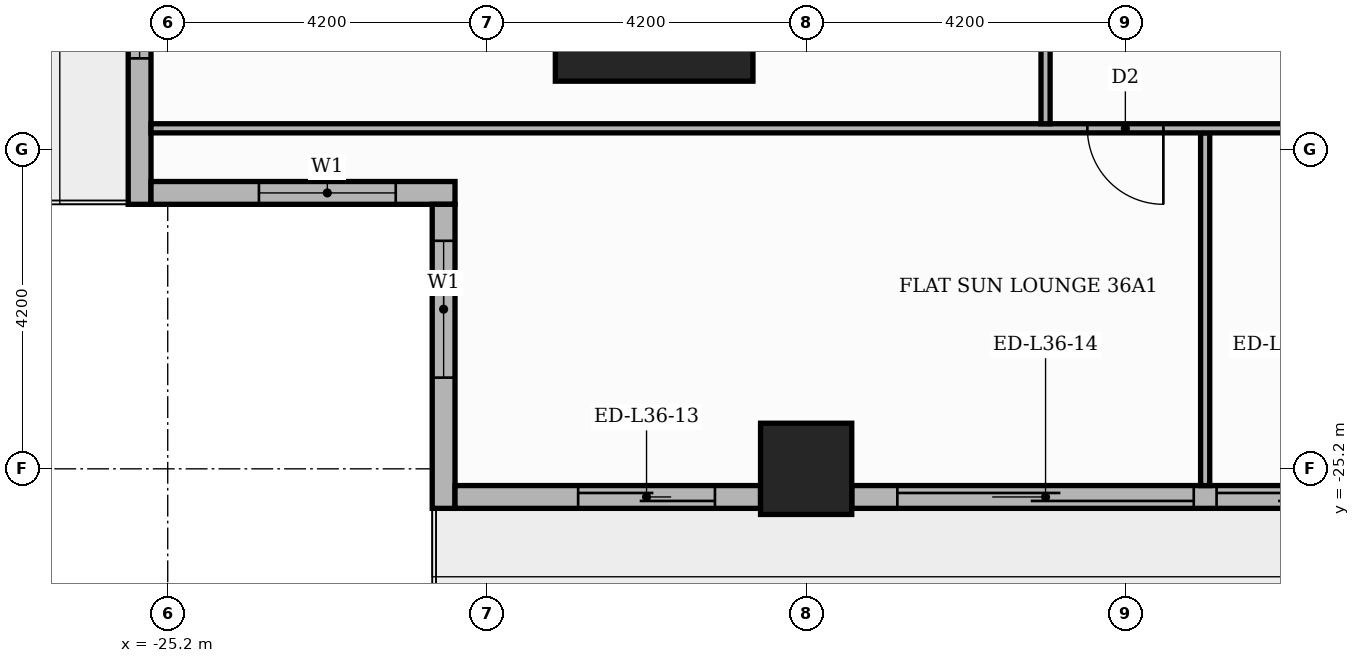
"""IFC4 building model, lengths in metres.
Left out: names, types, materials, properties, quantities, classifications, styles, units other than length and angle.
Written with IfcOpenShell. Run it as: python <this file> out.ifc"""

import sys

from ifc_helpers import new_model, si_unit, direction, frame, frame_2d, origin, origin_2d, place, context, subcontext, project, spatial, rectangle, extrude, element, fill, save


model = new_model("IFC4")
c1 = context("Model", 3, precision=1e-05, world=origin(), true_north=direction((0.0, 1.0)))
c2 = subcontext(c1, "Body", "Model", "MODEL_VIEW")
j1 = project(units=[si_unit("LENGTHUNIT", "METRE"), si_unit("PLANEANGLEUNIT", "RADIAN")], contexts=[c1])
p1 = place(None, origin())
s1 = spatial("IfcSite", under=j1, at=p1, CompositionType="ELEMENT")
p2 = place(p1, origin())
s2 = spatial("IfcBuilding", under=s1, at=p2, CompositionType="ELEMENT")
p3 = place(p2, frame((0.0, 0.0, 153.3)))
s3 = spatial("IfcBuildingStorey", under=s2, at=p3, CompositionType="ELEMENT", Elevation=153.3)
p4 = place(p3, frame((-18.8, -18.8, 0.0), z_axis=(0.0, 0.0, 1.0), x_axis=(1.0, 0.0, 0.0)))
e1 = element("IfcColumn", 1, at=p4, inside=s3, PredefinedType="COLUMN", context=c2, shape_type="SweptSolid", body=[
    extrude(rectangle(XDim=2.6, YDim=2.6, at=origin_2d()), origin(), (0.0, 0.0, 1.0), 3.9),
])
p5 = place(p3, frame((-16.8, -25.2, 0.0), z_axis=(0.0, 0.0, 1.0), x_axis=(1.0, 0.0, 0.0)))
e2 = element("IfcColumn", 2, at=p5, inside=s3, PredefinedType="COLUMN", context=c2, shape_type="SweptSolid", body=[
    extrude(rectangle(XDim=1.2, YDim=1.2, at=origin_2d()), origin(), (0.0, 0.0, 1.0), 3.9),
])
p6 = place(p3, frame((-25.57, -17.4, 0.0), z_axis=(0.0, 0.0, 1.0), x_axis=(0.0, -1.0, 0.0)))
e3 = element("IfcWall", 3, at=p6, inside=s3, PredefinedType="STANDARD", context=c2, shape_type="SweptSolid", body=[
    extrude(rectangle(XDim=4.32, YDim=0.3, at=frame_2d((2.16, 0.0))), origin(), (0.0, 0.0, 1.0), 3.48),
])
p7 = place(p6, frame((0.6, 0.0, 0.9)))
e4 = element("IfcOpeningElement", 4, at=p7, cuts=e3, PredefinedType="OPENING", context=c2, shape_type="SweptSolid", body=[
    extrude(rectangle(XDim=1.8, YDim=2.1, at=frame_2d((0.9, 1.05))), frame((0.0, 0.16, 0.0), z_axis=(0.0, -1.0, 0.0), x_axis=(1.0, 0.0, 0.0)), (0.0, 0.0, 1.0), 0.32),
])
p8 = place(p3, frame((-25.42, -21.57, 0.0), z_axis=(0.0, 0.0, 1.0), x_axis=(1.0, 0.0, 0.0)))
e5 = element("IfcWall", 5, at=p8, inside=s3, PredefinedType="STANDARD", context=c2, shape_type="SweptSolid", body=[
    extrude(rectangle(XDim=4.0, YDim=0.3, at=frame_2d((2.0, 0.0))), origin(), (0.0, 0.0, 1.0), 3.48),
])
p9 = place(p8, frame((1.42, 0.0, 0.9)))
e6 = element("IfcOpeningElement", 6, at=p9, cuts=e5, PredefinedType="OPENING", context=c2, shape_type="SweptSolid", body=[
    extrude(rectangle(XDim=1.8, YDim=2.1, at=frame_2d((0.9, 1.05))), frame((0.0, 0.16, 0.0), z_axis=(0.0, -1.0, 0.0), x_axis=(1.0, 0.0, 0.0)), (0.0, 0.0, 1.0), 0.32),
])
p10 = place(p3, frame((-21.57, -21.72, 0.0), z_axis=(0.0, 0.0, 1.0), x_axis=(0.0, -1.0, 0.0)))
e7 = element("IfcWall", 7, at=p10, inside=s3, PredefinedType="STANDARD", context=c2, shape_type="SweptSolid", body=[
    extrude(rectangle(XDim=4.0, YDim=0.3, at=frame_2d((2.0, 0.0))), origin(), (0.0, 0.0, 1.0), 3.48),
])
p11 = place(p10, frame((0.48, 0.0, 0.9)))
e8 = element("IfcOpeningElement", 8, at=p11, cuts=e7, PredefinedType="OPENING", context=c2, shape_type="SweptSolid", body=[
    extrude(rectangle(XDim=1.8, YDim=2.1, at=frame_2d((0.9, 1.05))), frame((0.0, 0.16, 0.0), z_axis=(0.0, -1.0, 0.0), x_axis=(1.0, 0.0, 0.0)), (0.0, 0.0, 1.0), 0.32),
])
p12 = place(p3, frame((-21.42, -25.57, 0.0), z_axis=(0.0, 0.0, 1.0), x_axis=(1.0, 0.0, 0.0)))
e9 = element("IfcWall", 9, at=p12, inside=s3, PredefinedType="STANDARD", context=c2, shape_type="SweptSolid", body=[
    extrude(rectangle(XDim=4.02, YDim=0.3, at=frame_2d((2.01, 0.0))), origin(), (0.0, 0.0, 1.0), 3.48),
])
p13 = place(p12, frame((1.62, 0.0, 0.0)))
e10 = element("IfcOpeningElement", 10, at=p13, cuts=e9, PredefinedType="OPENING", context=c2, shape_type="SweptSolid", body=[
    extrude(rectangle(XDim=1.8, YDim=2.4, at=frame_2d((0.9, 1.2))), frame((0.0, 0.16, 0.0), z_axis=(0.0, -1.0, 0.0), x_axis=(1.0, 0.0, 0.0)), (0.0, 0.0, 1.0), 0.32),
])
p14 = place(p3, frame((-16.2, -25.57, 0.0), z_axis=(0.0, 0.0, 1.0), x_axis=(1.0, 0.0, 0.0)))
e11 = element("IfcWall", 11, at=p14, inside=s3, PredefinedType="STANDARD", context=c2, shape_type="SweptSolid", body=[
    extrude(rectangle(XDim=7.2, YDim=0.3, at=frame_2d((3.6, 0.0))), origin(), (0.0, 0.0, 1.0), 3.48),
])
p15 = place(p14, frame((0.6, 0.0, 0.0)))
e12 = element("IfcOpeningElement", 12, at=p15, cuts=e11, PredefinedType="OPENING", context=c2, shape_type="SweptSolid", body=[
    extrude(rectangle(XDim=3.9, YDim=2.4, at=frame_2d((1.95, 1.2))), frame((0.0, 0.16, 0.0), z_axis=(0.0, -1.0, 0.0), x_axis=(1.0, 0.0, 0.0)), (0.0, 0.0, 1.0), 0.32),
])
p16 = place(p14, frame((4.8, 0.0, 0.0)))
e13 = element("IfcOpeningElement", 13, at=p16, cuts=e11, PredefinedType="OPENING", context=c2, shape_type="SweptSolid", body=[
    extrude(rectangle(XDim=1.8, YDim=2.4, at=frame_2d((0.9, 1.2))), frame((0.0, 0.16, 0.0), z_axis=(0.0, -1.0, 0.0), x_axis=(1.0, 0.0, 0.0)), (0.0, 0.0, 1.0), 0.32),
])
p17 = place(p3, frame((-11.55, -25.42, 0.0), z_axis=(0.0, 0.0, 1.0), x_axis=(0.0, 1.0, 0.0)))
e14 = element("IfcWall", 14, at=p17, inside=s3, PredefinedType="PARTITIONING", context=c2, shape_type="SweptSolid", body=[
    extrude(rectangle(XDim=4.64, YDim=0.12, at=frame_2d((2.32, 0.0))), origin(), (0.0, 0.0, 1.0), 3.48),
])
p18 = place(p3, frame((-25.42, -20.72, 0.0), z_axis=(0.0, 0.0, 1.0), x_axis=(1.0, 0.0, 0.0)))
e15 = element("IfcWall", 15, at=p18, inside=s3, PredefinedType="PARTITIONING", context=c2, shape_type="SweptSolid", body=[
    extrude(rectangle(XDim=38.97, YDim=0.12, at=frame_2d((19.485, 0.0))), origin(), (0.0, 0.0, 1.0), 3.48),
])
p19 = place(p18, frame((12.32, 0.0, 0.0)))
e16 = element("IfcOpeningElement", 16, at=p19, cuts=e15, PredefinedType="OPENING", context=c2, shape_type="SweptSolid", body=[
    extrude(rectangle(XDim=1.0, YDim=2.1, at=frame_2d((0.5, 1.05))), frame((0.0, 0.07, 0.0), z_axis=(0.0, -1.0, 0.0), x_axis=(1.0, 0.0, 0.0)), (0.0, 0.0, 1.0), 0.14),
])
p20 = place(p18, frame((17.57, 0.0, 0.0)))
e17 = element("IfcOpeningElement", 17, at=p20, cuts=e15, PredefinedType="OPENING", context=c2, shape_type="SweptSolid", body=[
    extrude(rectangle(XDim=1.0, YDim=2.1, at=frame_2d((0.5, 1.05))), frame((0.0, 0.07, 0.0), z_axis=(0.0, -1.0, 0.0), x_axis=(1.0, 0.0, 0.0)), (0.0, 0.0, 1.0), 0.14),
])
p21 = place(p18, frame((24.97, 0.0, 0.0)))
e18 = element("IfcOpeningElement", 18, at=p21, cuts=e15, PredefinedType="OPENING", context=c2, shape_type="SweptSolid", body=[
    extrude(rectangle(XDim=0.9, YDim=2.1, at=frame_2d((0.45, 1.05))), frame((0.0, 0.07, 0.0), z_axis=(0.0, -1.0, 0.0), x_axis=(1.0, 0.0, 0.0)), (0.0, 0.0, 1.0), 0.14),
])
p22 = place(p18, frame((34.42, 0.0, 0.0)))
e19 = element("IfcOpeningElement", 19, at=p22, cuts=e15, PredefinedType="OPENING", context=c2, shape_type="SweptSolid", body=[
    extrude(rectangle(XDim=0.9, YDim=2.1, at=frame_2d((0.45, 1.05))), frame((0.0, 0.07, 0.0), z_axis=(0.0, -1.0, 0.0), x_axis=(1.0, 0.0, 0.0)), (0.0, 0.0, 1.0), 0.14),
])
p23 = place(p3, frame((-13.65, -20.66, 0.0), z_axis=(0.0, 0.0, 1.0), x_axis=(0.0, 1.0, 0.0)))
e20 = element("IfcWall", 20, at=p23, inside=s3, PredefinedType="PARTITIONING", context=c2, shape_type="SweptSolid", body=[
    extrude(rectangle(XDim=6.91, YDim=0.12, at=frame_2d((3.455, 0.0))), origin(), (0.0, 0.0, 1.0), 3.48),
])
p24 = place(p23, frame((3.025, 0.0, 0.0)))
e21 = element("IfcOpeningElement", 21, at=p24, cuts=e20, PredefinedType="OPENING", context=c2, shape_type="SweptSolid", body=[
    extrude(rectangle(XDim=0.9, YDim=2.1, at=frame_2d((0.45, 1.05))), frame((0.0, 0.07, 0.0), z_axis=(0.0, -1.0, 0.0), x_axis=(1.0, 0.0, 0.0)), (0.0, 0.0, 1.0), 0.14),
])
p25 = place(p7, origin())
e22 = element("IfcWindow", 22, at=p25, inside=s3, PartitioningType="SINGLE_PANEL", PredefinedType="WINDOW", context=c2, shape_type="SweptSolid", body=[
    extrude(rectangle(XDim=1.8, YDim=2.1, at=frame_2d((0.9, 1.05))), frame((0.0, 0.03, 0.0), z_axis=(0.0, -1.0, 0.0), x_axis=(1.0, 0.0, 0.0)), (0.0, 0.0, 1.0), 0.06),
])
fill(e4, e22)
p26 = place(p9, origin())
e23 = element("IfcWindow", 23, at=p26, inside=s3, PartitioningType="SINGLE_PANEL", PredefinedType="WINDOW", context=c2, shape_type="SweptSolid", body=[
    extrude(rectangle(XDim=1.8, YDim=2.1, at=frame_2d((0.9, 1.05))), frame((0.0, 0.03, 0.0), z_axis=(0.0, -1.0, 0.0), x_axis=(1.0, 0.0, 0.0)), (0.0, 0.0, 1.0), 0.06),
])
fill(e6, e23)
p27 = place(p11, origin())
e24 = element("IfcWindow", 24, at=p27, inside=s3, PartitioningType="SINGLE_PANEL", PredefinedType="WINDOW", context=c2, shape_type="SweptSolid", body=[
    extrude(rectangle(XDim=1.8, YDim=2.1, at=frame_2d((0.9, 1.05))), frame((0.0, 0.03, 0.0), z_axis=(0.0, -1.0, 0.0), x_axis=(1.0, 0.0, 0.0)), (0.0, 0.0, 1.0), 0.06),
])
fill(e8, e24)
p28 = place(p13, origin())
e25 = element("IfcDoor", 25, at=p28, inside=s3, OperationType="SLIDING_TO_RIGHT", PredefinedType="DOOR", context=c2, shape_type="SweptSolid", body=[
    extrude(rectangle(XDim=1.8, YDim=2.4, at=frame_2d((0.9, 1.2))), frame((0.0, 0.025, 0.0), z_axis=(0.0, -1.0, 0.0), x_axis=(1.0, 0.0, 0.0)), (0.0, 0.0, 1.0), 0.05),
])
fill(e10, e25)
p29 = place(p15, origin())
e26 = element("IfcDoor", 26, at=p29, inside=s3, OperationType="SLIDING_TO_LEFT", PredefinedType="DOOR", context=c2, shape_type="SweptSolid", body=[
    extrude(rectangle(XDim=3.9, YDim=2.4, at=frame_2d((1.95, 1.2))), frame((0.0, 0.025, 0.0), z_axis=(0.0, -1.0, 0.0), x_axis=(1.0, 0.0, 0.0)), (0.0, 0.0, 1.0), 0.05),
])
fill(e12, e26)
p30 = place(p16, origin())
e27 = element("IfcDoor", 27, at=p30, inside=s3, OperationType="SLIDING_TO_RIGHT", PredefinedType="DOOR", context=c2, shape_type="SweptSolid", body=[
    extrude(rectangle(XDim=1.8, YDim=2.4, at=frame_2d((0.9, 1.2))), frame((0.0, 0.025, 0.0), z_axis=(0.0, -1.0, 0.0), x_axis=(1.0, 0.0, 0.0)), (0.0, 0.0, 1.0), 0.05),
])
fill(e13, e27)
p31 = place(p19, frame((1.0, 0.0, 0.0), z_axis=(0.0, 0.0, 1.0), x_axis=(-1.0, 0.0, 0.0)))
e28 = element("IfcDoor", 28, at=p31, inside=s3, OperationType="SINGLE_SWING_RIGHT", PredefinedType="DOOR", context=c2, shape_type="SweptSolid", body=[
    extrude(rectangle(XDim=1.0, YDim=2.1, at=frame_2d((0.5, 1.05))), frame((0.0, 0.025, 0.0), z_axis=(0.0, -1.0, 0.0), x_axis=(1.0, 0.0, 0.0)), (0.0, 0.0, 1.0), 0.05),
])
fill(e16, e28)
save(model, sys.argv[1])
